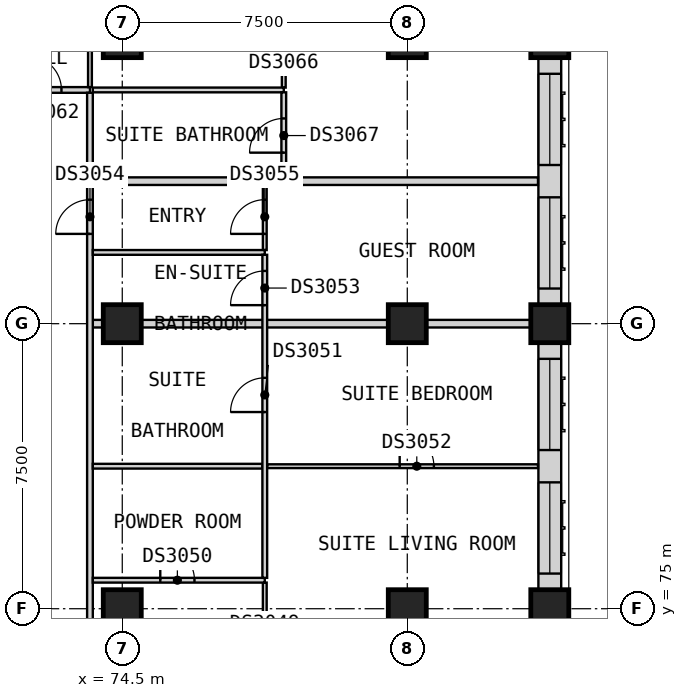
"""IFC4 building model, lengths in metres.
Left out: names, types, materials, properties, quantities, classifications, styles, units other than length and angle.
Written with IfcOpenShell. Run it as: python <this file> out.ifc"""

import sys

from ifc_helpers import new_model, si_unit, direction, frame, frame_2d, origin, origin_2d, place, context, subcontext, project, spatial, rectangle, extrude, element, fill, save


model = new_model("IFC4")
c1 = context("Model", 3, precision=1e-05, world=origin(), true_north=direction((0.0, 1.0)))
c2 = subcontext(c1, "Body", "Model", "MODEL_VIEW")
j1 = project(units=[si_unit("LENGTHUNIT", "METRE"), si_unit("PLANEANGLEUNIT", "RADIAN")], contexts=[c1])
p1 = place(None, origin())
s1 = spatial("IfcSite", under=j1, at=p1, CompositionType="ELEMENT")
p2 = place(p1, origin())
s2 = spatial("IfcBuilding", under=s1, at=p2, CompositionType="ELEMENT")
p3 = place(p2, frame((0.0, 0.0, 137.4)))
s3 = spatial("IfcBuildingStorey", under=s2, at=p3, CompositionType="ELEMENT", Elevation=137.4)
for number, where, z_axis, x_axis in (
    (1, (85.75, 75.0, 0.0), (0.0, 0.0, 1.0), (1.0, 0.0, 0.0)),
    (2, (85.75, 82.5, 0.0), (0.0, 0.0, 1.0), (1.0, 0.0, 0.0)),
    (3, (85.75, 90.0, 0.0), (0.0, 0.0, 1.0), (1.0, 0.0, 0.0)),
    (4, (74.5, 75.0, 0.0), (0.0, 0.0, 1.0), (1.0, 0.0, 0.0)),
    (5, (74.5, 82.5, 0.0), (0.0, 0.0, 1.0), (1.0, 0.0, 0.0)),
    (6, (74.5, 90.0, 0.0), (0.0, 0.0, 1.0), (1.0, 0.0, 0.0)),
    (7, (82.0, 75.0, 0.0), (0.0, 0.0, 1.0), (1.0, 0.0, 0.0)),
    (8, (82.0, 82.5, 0.0), (0.0, 0.0, 1.0), (1.0, 0.0, 0.0)),
    (9, (82.0, 90.0, 0.0), (0.0, 0.0, 1.0), (1.0, 0.0, 0.0)),
):
    element("IfcColumn", number, at=place(p3, frame(where, z_axis=z_axis, x_axis=x_axis)), inside=s3, PredefinedType="COLUMN", context=c2, shape_type="SweptSolid", body=[
        extrude(rectangle(XDim=1.0, YDim=1.0, at=origin_2d()), origin(), (0.0, 0.0, 1.0), 3.6),
    ])
p4 = place(p3, frame((85.75, 75.5, 0.0), z_axis=(0.0, 0.0, 1.0), x_axis=(0.0, 1.0, 0.0)))
e10 = element("IfcWall", 10, at=p4, inside=s3, PredefinedType="SOLIDWALL", context=c2, shape_type="SweptSolid", body=[
    extrude(rectangle(XDim=6.5, YDim=0.6, at=frame_2d((3.25, 0.0))), origin(), (0.0, 0.0, 1.0), 2.85),
])
p5 = place(p4, frame((0.425, 0.0, 0.8)))
e11 = element("IfcOpeningElement", 11, at=p5, cuts=e10, PredefinedType="OPENING", context=c2, shape_type="SweptSolid", body=[
    extrude(rectangle(XDim=2.4, YDim=1.8, at=frame_2d((1.2, 0.9))), frame((0.0, 0.31, 0.0), z_axis=(0.0, -1.0, 0.0), x_axis=(1.0, 0.0, 0.0)), (0.0, 0.0, 1.0), 0.62),
])
p6 = place(p4, frame((3.675, 0.0, 0.8)))
e12 = element("IfcOpeningElement", 12, at=p6, cuts=e10, PredefinedType="OPENING", context=c2, shape_type="SweptSolid", body=[
    extrude(rectangle(XDim=2.4, YDim=1.8, at=frame_2d((1.2, 0.9))), frame((0.0, 0.31, 0.0), z_axis=(0.0, -1.0, 0.0), x_axis=(1.0, 0.0, 0.0)), (0.0, 0.0, 1.0), 0.62),
])
p7 = place(p3, frame((85.75, 83.0, 0.0), z_axis=(0.0, 0.0, 1.0), x_axis=(0.0, 1.0, 0.0)))
e13 = element("IfcWall", 13, at=p7, inside=s3, PredefinedType="SOLIDWALL", context=c2, shape_type="SweptSolid", body=[
    extrude(rectangle(XDim=6.5, YDim=0.6, at=frame_2d((3.25, 0.0))), origin(), (0.0, 0.0, 1.0), 2.85),
])
p8 = place(p7, frame((0.425, 0.0, 0.8)))
e14 = element("IfcOpeningElement", 14, at=p8, cuts=e13, PredefinedType="OPENING", context=c2, shape_type="SweptSolid", body=[
    extrude(rectangle(XDim=2.4, YDim=1.8, at=frame_2d((1.2, 0.9))), frame((0.0, 0.31, 0.0), z_axis=(0.0, -1.0, 0.0), x_axis=(1.0, 0.0, 0.0)), (0.0, 0.0, 1.0), 0.62),
])
p9 = place(p7, frame((3.675, 0.0, 0.8)))
e15 = element("IfcOpeningElement", 15, at=p9, cuts=e13, PredefinedType="OPENING", context=c2, shape_type="SweptSolid", body=[
    extrude(rectangle(XDim=2.4, YDim=1.8, at=frame_2d((1.2, 0.9))), frame((0.0, 0.31, 0.0), z_axis=(0.0, -1.0, 0.0), x_axis=(1.0, 0.0, 0.0)), (0.0, 0.0, 1.0), 0.62),
])
p10 = place(p3, frame((73.725, 82.5, 0.0), z_axis=(0.0, 0.0, 1.0), x_axis=(1.0, 0.0, 0.0)))
e16 = element("IfcWall", 16, at=p10, inside=s3, PredefinedType="PARTITIONING", context=c2, shape_type="SweptSolid", body=[
    extrude(rectangle(XDim=12.525, YDim=0.2, at=frame_2d((6.262, 0.0))), origin(), (0.0, 0.0, 1.0), 3.35),
])
p11 = place(p3, frame((73.725, 86.25, 0.0), z_axis=(0.0, 0.0, 1.0), x_axis=(1.0, 0.0, 0.0)))
e17 = element("IfcWall", 17, at=p11, inside=s3, PredefinedType="PARTITIONING", context=c2, shape_type="SweptSolid", body=[
    extrude(rectangle(XDim=11.715, YDim=0.2, at=frame_2d((5.857, 0.0))), origin(), (0.0, 0.0, 1.0), 3.35),
])
p12 = place(p3, frame((33.75, 88.65, 0.0), z_axis=(0.0, 0.0, 1.0), x_axis=(1.0, 0.0, 0.0)))
e18 = element("IfcWall", 18, at=p12, inside=s3, PredefinedType="PARTITIONING", context=c2, shape_type="SweptSolid", body=[
    extrude(rectangle(XDim=39.9, YDim=0.15, at=frame_2d((19.95, 0.0))), origin(), (0.0, 0.0, 1.0), 3.35),
])
p13 = place(p12, frame((5.175, 0.0, 0.0)))
e19 = element("IfcOpeningElement", 19, at=p13, cuts=e18, PredefinedType="OPENING", context=c2, shape_type="SweptSolid", body=[
    extrude(rectangle(XDim=0.9, YDim=2.1, at=frame_2d((0.45, 1.05))), frame((0.0, 0.085, 0.0), z_axis=(0.0, -1.0, 0.0), x_axis=(1.0, 0.0, 0.0)), (0.0, 0.0, 1.0), 0.17),
])
p14 = place(p12, frame((13.05, 0.0, 0.0)))
e20 = element("IfcOpeningElement", 20, at=p14, cuts=e18, PredefinedType="OPENING", context=c2, shape_type="SweptSolid", body=[
    extrude(rectangle(XDim=0.9, YDim=2.1, at=frame_2d((0.45, 1.05))), frame((0.0, 0.085, 0.0), z_axis=(0.0, -1.0, 0.0), x_axis=(1.0, 0.0, 0.0)), (0.0, 0.0, 1.0), 0.17),
])
p15 = place(p12, frame((28.05, 0.0, 0.0)))
e21 = element("IfcOpeningElement", 21, at=p15, cuts=e18, PredefinedType="OPENING", context=c2, shape_type="SweptSolid", body=[
    extrude(rectangle(XDim=0.9, YDim=2.1, at=frame_2d((0.45, 1.05))), frame((0.0, 0.085, 0.0), z_axis=(0.0, -1.0, 0.0), x_axis=(1.0, 0.0, 0.0)), (0.0, 0.0, 1.0), 0.17),
])
p16 = place(p12, frame((32.262, 0.0, 0.0)))
e22 = element("IfcOpeningElement", 22, at=p16, cuts=e18, PredefinedType="OPENING", context=c2, shape_type="SweptSolid", body=[
    extrude(rectangle(XDim=0.9, YDim=2.1, at=frame_2d((0.45, 1.05))), frame((0.0, 0.085, 0.0), z_axis=(0.0, -1.0, 0.0), x_axis=(1.0, 0.0, 0.0)), (0.0, 0.0, 1.0), 0.17),
])
p17 = place(p12, frame((36.113, 0.0, 0.0)))
e23 = element("IfcOpeningElement", 23, at=p17, cuts=e18, PredefinedType="OPENING", context=c2, shape_type="SweptSolid", body=[
    extrude(rectangle(XDim=0.9, YDim=2.1, at=frame_2d((0.45, 1.05))), frame((0.0, 0.085, 0.0), z_axis=(0.0, -1.0, 0.0), x_axis=(1.0, 0.0, 0.0)), (0.0, 0.0, 1.0), 0.17),
])
p18 = place(p12, frame((38.25, 0.0, 0.0)))
e24 = element("IfcOpeningElement", 24, at=p18, cuts=e18, PredefinedType="OPENING", context=c2, shape_type="SweptSolid", body=[
    extrude(rectangle(XDim=0.9, YDim=2.1, at=frame_2d((0.45, 1.05))), frame((0.0, 0.085, 0.0), z_axis=(0.0, -1.0, 0.0), x_axis=(1.0, 0.0, 0.0)), (0.0, 0.0, 1.0), 0.17),
])
p19 = place(p3, frame((73.65, 50.175, 0.0), z_axis=(0.0, 0.0, 1.0), x_axis=(0.0, 1.0, 0.0)))
e25 = element("IfcWall", 25, at=p19, inside=s3, PredefinedType="PARTITIONING", context=c2, shape_type="SweptSolid", body=[
    extrude(rectangle(XDim=38.4, YDim=0.15, at=frame_2d((19.2, 0.0))), origin(), (0.0, 0.0, 1.0), 3.35),
])
p20 = place(p19, frame((4.688, 0.0, 0.0)))
e26 = element("IfcOpeningElement", 26, at=p20, cuts=e25, PredefinedType="OPENING", context=c2, shape_type="SweptSolid", body=[
    extrude(rectangle(XDim=0.9, YDim=2.1, at=frame_2d((0.45, 1.05))), frame((0.0, 0.085, 0.0), z_axis=(0.0, -1.0, 0.0), x_axis=(1.0, 0.0, 0.0)), (0.0, 0.0, 1.0), 0.17),
])
p21 = place(p19, frame((11.625, 0.0, 0.0)))
e27 = element("IfcOpeningElement", 27, at=p21, cuts=e25, PredefinedType="OPENING", context=c2, shape_type="SweptSolid", body=[
    extrude(rectangle(XDim=0.9, YDim=2.1, at=frame_2d((0.45, 1.05))), frame((0.0, 0.085, 0.0), z_axis=(0.0, -1.0, 0.0), x_axis=(1.0, 0.0, 0.0)), (0.0, 0.0, 1.0), 0.17),
])
p22 = place(p19, frame((22.875, 0.0, 0.0)))
e28 = element("IfcOpeningElement", 28, at=p22, cuts=e25, PredefinedType="OPENING", context=c2, shape_type="SweptSolid", body=[
    extrude(rectangle(XDim=0.9, YDim=2.1, at=frame_2d((0.45, 1.05))), frame((0.0, 0.085, 0.0), z_axis=(0.0, -1.0, 0.0), x_axis=(1.0, 0.0, 0.0)), (0.0, 0.0, 1.0), 0.17),
])
p23 = place(p19, frame((34.688, 0.0, 0.0)))
e29 = element("IfcOpeningElement", 29, at=p23, cuts=e25, PredefinedType="OPENING", context=c2, shape_type="SweptSolid", body=[
    extrude(rectangle(XDim=0.9, YDim=2.1, at=frame_2d((0.45, 1.05))), frame((0.0, 0.085, 0.0), z_axis=(0.0, -1.0, 0.0), x_axis=(1.0, 0.0, 0.0)), (0.0, 0.0, 1.0), 0.17),
])
p24 = place(p3, frame((78.312, 78.75, 0.0), z_axis=(0.0, 0.0, 1.0), x_axis=(1.0, 0.0, 0.0)))
e30 = element("IfcWall", 30, at=p24, inside=s3, PredefinedType="PARTITIONING", context=c2, shape_type="SweptSolid", body=[
    extrude(rectangle(XDim=7.127, YDim=0.1, at=frame_2d((3.564, 0.0))), origin(), (0.0, 0.0, 1.0), 3.35),
])
p25 = place(p24, frame((3.488, 0.0, 0.0)))
e31 = element("IfcOpeningElement", 31, at=p25, cuts=e30, PredefinedType="OPENING", context=c2, shape_type="SweptSolid", body=[
    extrude(rectangle(XDim=0.9, YDim=2.1, at=frame_2d((0.45, 1.05))), frame((0.0, 0.06, 0.0), z_axis=(0.0, -1.0, 0.0), x_axis=(1.0, 0.0, 0.0)), (0.0, 0.0, 1.0), 0.12),
])
p26 = place(p3, frame((73.65, 88.725, 0.0), z_axis=(0.0, 0.0, 1.0), x_axis=(0.0, 1.0, 0.0)))
e32 = element("IfcWall", 32, at=p26, inside=s3, PredefinedType="PARTITIONING", context=c2, shape_type="SweptSolid", body=[
    extrude(rectangle(XDim=3.475, YDim=0.1, at=frame_2d((1.737, 0.0))), origin(), (0.0, 0.0, 1.0), 3.35),
])
p27 = place(p26, frame((1.825, 0.0, 0.0)))
e33 = element("IfcOpeningElement", 33, at=p27, cuts=e32, PredefinedType="OPENING", context=c2, shape_type="SweptSolid", body=[
    extrude(rectangle(XDim=0.9, YDim=2.1, at=frame_2d((0.45, 1.05))), frame((0.0, 0.06, 0.0), z_axis=(0.0, -1.0, 0.0), x_axis=(1.0, 0.0, 0.0)), (0.0, 0.0, 1.0), 0.12),
])
p28 = place(p3, frame((78.25, 71.35, 0.0), z_axis=(0.0, 0.0, 1.0), x_axis=(0.0, 1.0, 0.0)))
e34 = element("IfcWall", 34, at=p28, inside=s3, PredefinedType="PARTITIONING", context=c2, shape_type="SweptSolid", body=[
    extrude(rectangle(XDim=4.337, YDim=0.1, at=frame_2d((2.169, 0.0))), origin(), (0.0, 0.0, 1.0), 3.35),
])
p29 = place(p28, frame((1.7, 0.0, 0.0)))
e35 = element("IfcOpeningElement", 35, at=p29, cuts=e34, PredefinedType="OPENING", context=c2, shape_type="SweptSolid", body=[
    extrude(rectangle(XDim=0.9, YDim=2.1, at=frame_2d((0.45, 1.05))), frame((0.0, 0.06, 0.0), z_axis=(0.0, -1.0, 0.0), x_axis=(1.0, 0.0, 0.0)), (0.0, 0.0, 1.0), 0.12),
])
p30 = place(p3, frame((78.25, 84.438, 0.0), z_axis=(0.0, 0.0, 1.0), x_axis=(0.0, 1.0, 0.0)))
e36 = element("IfcWall", 36, at=p30, inside=s3, PredefinedType="PARTITIONING", context=c2, shape_type="SweptSolid", body=[
    extrude(rectangle(XDim=1.712, YDim=0.1, at=frame_2d((0.856, 0.0))), origin(), (0.0, 0.0, 1.0), 3.35),
])
p31 = place(p30, frame((0.425, 0.0, 0.0)))
e37 = element("IfcOpeningElement", 37, at=p31, cuts=e36, PredefinedType="OPENING", context=c2, shape_type="SweptSolid", body=[
    extrude(rectangle(XDim=0.9, YDim=2.1, at=frame_2d((0.45, 1.05))), frame((0.0, 0.06, 0.0), z_axis=(0.0, -1.0, 0.0), x_axis=(1.0, 0.0, 0.0)), (0.0, 0.0, 1.0), 0.12),
])
p32 = place(p3, frame((78.75, 88.712, 0.0), z_axis=(0.0, 0.0, 1.0), x_axis=(0.0, 1.0, 0.0)))
e38 = element("IfcWall", 38, at=p32, inside=s3, PredefinedType="PARTITIONING", context=c2, shape_type="SweptSolid", body=[
    extrude(rectangle(XDim=11.728, YDim=0.1, at=frame_2d((5.864, 0.0))), origin(), (0.0, 0.0, 1.0), 3.35),
])
p33 = place(p32, frame((9.837, 0.0, 0.0)))
e39 = element("IfcOpeningElement", 39, at=p33, cuts=e38, PredefinedType="OPENING", context=c2, shape_type="SweptSolid", body=[
    extrude(rectangle(XDim=0.9, YDim=2.1, at=frame_2d((0.45, 1.05))), frame((0.0, 0.06, 0.0), z_axis=(0.0, -1.0, 0.0), x_axis=(1.0, 0.0, 0.0)), (0.0, 0.0, 1.0), 0.12),
])
p34 = place(p32, frame((1.288, 0.0, 0.0)))
e40 = element("IfcOpeningElement", 40, at=p34, cuts=e38, PredefinedType="OPENING", context=c2, shape_type="SweptSolid", body=[
    extrude(rectangle(XDim=0.9, YDim=2.1, at=frame_2d((0.45, 1.05))), frame((0.0, 0.06, 0.0), z_axis=(0.0, -1.0, 0.0), x_axis=(1.0, 0.0, 0.0)), (0.0, 0.0, 1.0), 0.12),
])
p35 = place(p3, frame((73.725, 75.75, 0.0), z_axis=(0.0, 0.0, 1.0), x_axis=(1.0, 0.0, 0.0)))
e41 = element("IfcWall", 41, at=p35, inside=s3, PredefinedType="PARTITIONING", context=c2, shape_type="SweptSolid", body=[
    extrude(rectangle(XDim=4.525, YDim=0.125, at=frame_2d((2.262, 0.0))), origin(), (0.0, 0.0, 1.0), 3.35),
])
p36 = place(p35, frame((1.775, 0.0, 0.0)))
e42 = element("IfcOpeningElement", 42, at=p36, cuts=e41, PredefinedType="OPENING", context=c2, shape_type="SweptSolid", body=[
    extrude(rectangle(XDim=0.9, YDim=2.1, at=frame_2d((0.45, 1.05))), frame((0.0, 0.073, 0.0), z_axis=(0.0, -1.0, 0.0), x_axis=(1.0, 0.0, 0.0)), (0.0, 0.0, 1.0), 0.145),
])
p37 = place(p3, frame((73.725, 78.75, 0.0), z_axis=(0.0, 0.0, 1.0), x_axis=(1.0, 0.0, 0.0)))
e43 = element("IfcWall", 43, at=p37, inside=s3, PredefinedType="PARTITIONING", context=c2, shape_type="SweptSolid", body=[
    extrude(rectangle(XDim=4.462, YDim=0.125, at=frame_2d((2.231, 0.0))), origin(), (0.0, 0.0, 1.0), 3.35),
])
p38 = place(p3, frame((73.725, 84.375, 0.0), z_axis=(0.0, 0.0, 1.0), x_axis=(1.0, 0.0, 0.0)))
e44 = element("IfcWall", 44, at=p38, inside=s3, PredefinedType="PARTITIONING", context=c2, shape_type="SweptSolid", body=[
    extrude(rectangle(XDim=4.525, YDim=0.125, at=frame_2d((2.262, 0.0))), origin(), (0.0, 0.0, 1.0), 3.35),
])
p39 = place(p3, frame((73.725, 88.65, 0.0), z_axis=(0.0, 0.0, 1.0), x_axis=(1.0, 0.0, 0.0)))
e45 = element("IfcWall", 45, at=p39, inside=s3, PredefinedType="PARTITIONING", context=c2, shape_type="SweptSolid", body=[
    extrude(rectangle(XDim=5.025, YDim=0.125, at=frame_2d((2.512, 0.0))), origin(), (0.0, 0.0, 1.0), 3.35),
])
p40 = place(p3, frame((78.25, 75.812, 0.0), z_axis=(0.0, 0.0, 1.0), x_axis=(0.0, 1.0, 0.0)))
e46 = element("IfcWall", 46, at=p40, inside=s3, PredefinedType="PARTITIONING", context=c2, shape_type="SweptSolid", body=[
    extrude(rectangle(XDim=8.5, YDim=0.125, at=frame_2d((4.25, 0.0))), origin(), (0.0, 0.0, 1.0), 3.35),
])
p41 = place(p40, frame((4.363, 0.0, 0.0)))
e47 = element("IfcOpeningElement", 47, at=p41, cuts=e46, PredefinedType="OPENING", context=c2, shape_type="SweptSolid", body=[
    extrude(rectangle(XDim=0.9, YDim=2.1, at=frame_2d((0.45, 1.05))), frame((0.0, 0.073, 0.0), z_axis=(0.0, -1.0, 0.0), x_axis=(1.0, 0.0, 0.0)), (0.0, 0.0, 1.0), 0.145),
])
p42 = place(p40, frame((7.175, 0.0, 0.0)))
e48 = element("IfcOpeningElement", 48, at=p42, cuts=e46, PredefinedType="OPENING", context=c2, shape_type="SweptSolid", body=[
    extrude(rectangle(XDim=0.9, YDim=2.1, at=frame_2d((0.45, 1.05))), frame((0.0, 0.073, 0.0), z_axis=(0.0, -1.0, 0.0), x_axis=(1.0, 0.0, 0.0)), (0.0, 0.0, 1.0), 0.145),
])
p43 = place(p3, frame((78.75, 86.35, 0.0), z_axis=(0.0, 0.0, 1.0), x_axis=(0.0, 1.0, 0.0)))
e49 = element("IfcWall", 49, at=p43, inside=s3, PredefinedType="PARTITIONING", context=c2, shape_type="SweptSolid", body=[
    extrude(rectangle(XDim=2.237, YDim=0.125, at=frame_2d((1.119, 0.0))), origin(), (0.0, 0.0, 1.0), 3.35),
])
p44 = place(p43, frame((0.65, 0.0, 0.0)))
e50 = element("IfcOpeningElement", 50, at=p44, cuts=e49, PredefinedType="OPENING", context=c2, shape_type="SweptSolid", body=[
    extrude(rectangle(XDim=0.9, YDim=2.1, at=frame_2d((0.45, 1.05))), frame((0.0, 0.073, 0.0), z_axis=(0.0, -1.0, 0.0), x_axis=(1.0, 0.0, 0.0)), (0.0, 0.0, 1.0), 0.145),
])
p45 = place(p5, origin())
e51 = element("IfcWindow", 51, at=p45, inside=s3, PartitioningType="SINGLE_PANEL", PredefinedType="WINDOW", context=c2, shape_type="SweptSolid", body=[
    extrude(rectangle(XDim=2.4, YDim=1.8, at=frame_2d((1.2, 0.9))), frame((0.0, -0.07, 0.0), z_axis=(0.0, -1.0, 0.0), x_axis=(1.0, 0.0, 0.0)), (0.0, 0.0, 1.0), 0.06),
])
fill(e11, e51)
p46 = place(p6, origin())
e52 = element("IfcWindow", 52, at=p46, inside=s3, PartitioningType="SINGLE_PANEL", PredefinedType="WINDOW", context=c2, shape_type="SweptSolid", body=[
    extrude(rectangle(XDim=2.4, YDim=1.8, at=frame_2d((1.2, 0.9))), frame((0.0, -0.07, 0.0), z_axis=(0.0, -1.0, 0.0), x_axis=(1.0, 0.0, 0.0)), (0.0, 0.0, 1.0), 0.06),
])
fill(e12, e52)
p47 = place(p8, origin())
e53 = element("IfcWindow", 53, at=p47, inside=s3, PartitioningType="SINGLE_PANEL", PredefinedType="WINDOW", context=c2, shape_type="SweptSolid", body=[
    extrude(rectangle(XDim=2.4, YDim=1.8, at=frame_2d((1.2, 0.9))), frame((0.0, -0.07, 0.0), z_axis=(0.0, -1.0, 0.0), x_axis=(1.0, 0.0, 0.0)), (0.0, 0.0, 1.0), 0.06),
])
fill(e14, e53)
p48 = place(p9, origin())
e54 = element("IfcWindow", 54, at=p48, inside=s3, PartitioningType="SINGLE_PANEL", PredefinedType="WINDOW", context=c2, shape_type="SweptSolid", body=[
    extrude(rectangle(XDim=2.4, YDim=1.8, at=frame_2d((1.2, 0.9))), frame((0.0, -0.07, 0.0), z_axis=(0.0, -1.0, 0.0), x_axis=(1.0, 0.0, 0.0)), (0.0, 0.0, 1.0), 0.06),
])
fill(e15, e54)
p49 = place(p36, origin())
e55 = element("IfcDoor", 55, at=p49, inside=s3, OperationType="SINGLE_SWING_RIGHT", PredefinedType="DOOR", context=c2, shape_type="SweptSolid", body=[
    extrude(rectangle(XDim=0.9, YDim=2.1, at=frame_2d((0.45, 1.05))), frame((0.0, 0.025, 0.0), z_axis=(0.0, -1.0, 0.0), x_axis=(1.0, 0.0, 0.0)), (0.0, 0.0, 1.0), 0.05),
])
fill(e42, e55)
p50 = place(p41, origin())
e56 = element("IfcDoor", 56, at=p50, inside=s3, OperationType="SINGLE_SWING_LEFT", PredefinedType="DOOR", context=c2, shape_type="SweptSolid", body=[
    extrude(rectangle(XDim=0.9, YDim=2.1, at=frame_2d((0.45, 1.05))), frame((0.0, 0.025, 0.0), z_axis=(0.0, -1.0, 0.0), x_axis=(1.0, 0.0, 0.0)), (0.0, 0.0, 1.0), 0.05),
])
fill(e47, e56)
p51 = place(p25, origin())
e57 = element("IfcDoor", 57, at=p51, inside=s3, OperationType="SINGLE_SWING_RIGHT", PredefinedType="DOOR", context=c2, shape_type="SweptSolid", body=[
    extrude(rectangle(XDim=0.9, YDim=2.1, at=frame_2d((0.45, 1.05))), frame((0.0, 0.025, 0.0), z_axis=(0.0, -1.0, 0.0), x_axis=(1.0, 0.0, 0.0)), (0.0, 0.0, 1.0), 0.05),
])
fill(e31, e57)
p52 = place(p42, origin())
e58 = element("IfcDoor", 58, at=p52, inside=s3, OperationType="SINGLE_SWING_LEFT", PredefinedType="DOOR", context=c2, shape_type="SweptSolid", body=[
    extrude(rectangle(XDim=0.9, YDim=2.1, at=frame_2d((0.45, 1.05))), frame((0.0, 0.025, 0.0), z_axis=(0.0, -1.0, 0.0), x_axis=(1.0, 0.0, 0.0)), (0.0, 0.0, 1.0), 0.05),
])
fill(e48, e58)
p53 = place(p23, origin())
e59 = element("IfcDoor", 59, at=p53, inside=s3, OperationType="SINGLE_SWING_RIGHT", PredefinedType="DOOR", context=c2, shape_type="SweptSolid", body=[
    extrude(rectangle(XDim=0.9, YDim=2.1, at=frame_2d((0.45, 1.05))), frame((0.0, 0.025, 0.0), z_axis=(0.0, -1.0, 0.0), x_axis=(1.0, 0.0, 0.0)), (0.0, 0.0, 1.0), 0.05),
])
fill(e29, e59)
p54 = place(p31, origin())
e60 = element("IfcDoor", 60, at=p54, inside=s3, OperationType="SINGLE_SWING_LEFT", PredefinedType="DOOR", context=c2, shape_type="SweptSolid", body=[
    extrude(rectangle(XDim=0.9, YDim=2.1, at=frame_2d((0.45, 1.05))), frame((0.0, 0.025, 0.0), z_axis=(0.0, -1.0, 0.0), x_axis=(1.0, 0.0, 0.0)), (0.0, 0.0, 1.0), 0.05),
])
fill(e37, e60)
p55 = place(p18, origin())
e61 = element("IfcDoor", 61, at=p55, inside=s3, OperationType="SINGLE_SWING_RIGHT", PredefinedType="DOOR", context=c2, shape_type="SweptSolid", body=[
    extrude(rectangle(XDim=0.9, YDim=2.1, at=frame_2d((0.45, 1.05))), frame((0.0, 0.025, 0.0), z_axis=(0.0, -1.0, 0.0), x_axis=(1.0, 0.0, 0.0)), (0.0, 0.0, 1.0), 0.05),
])
fill(e24, e61)
p56 = place(p44, origin())
e62 = element("IfcDoor", 62, at=p56, inside=s3, OperationType="SINGLE_SWING_LEFT", PredefinedType="DOOR", context=c2, shape_type="SweptSolid", body=[
    extrude(rectangle(XDim=0.9, YDim=2.1, at=frame_2d((0.45, 1.05))), frame((0.0, 0.025, 0.0), z_axis=(0.0, -1.0, 0.0), x_axis=(1.0, 0.0, 0.0)), (0.0, 0.0, 1.0), 0.05),
])
fill(e50, e62)
save(model, sys.argv[1])
